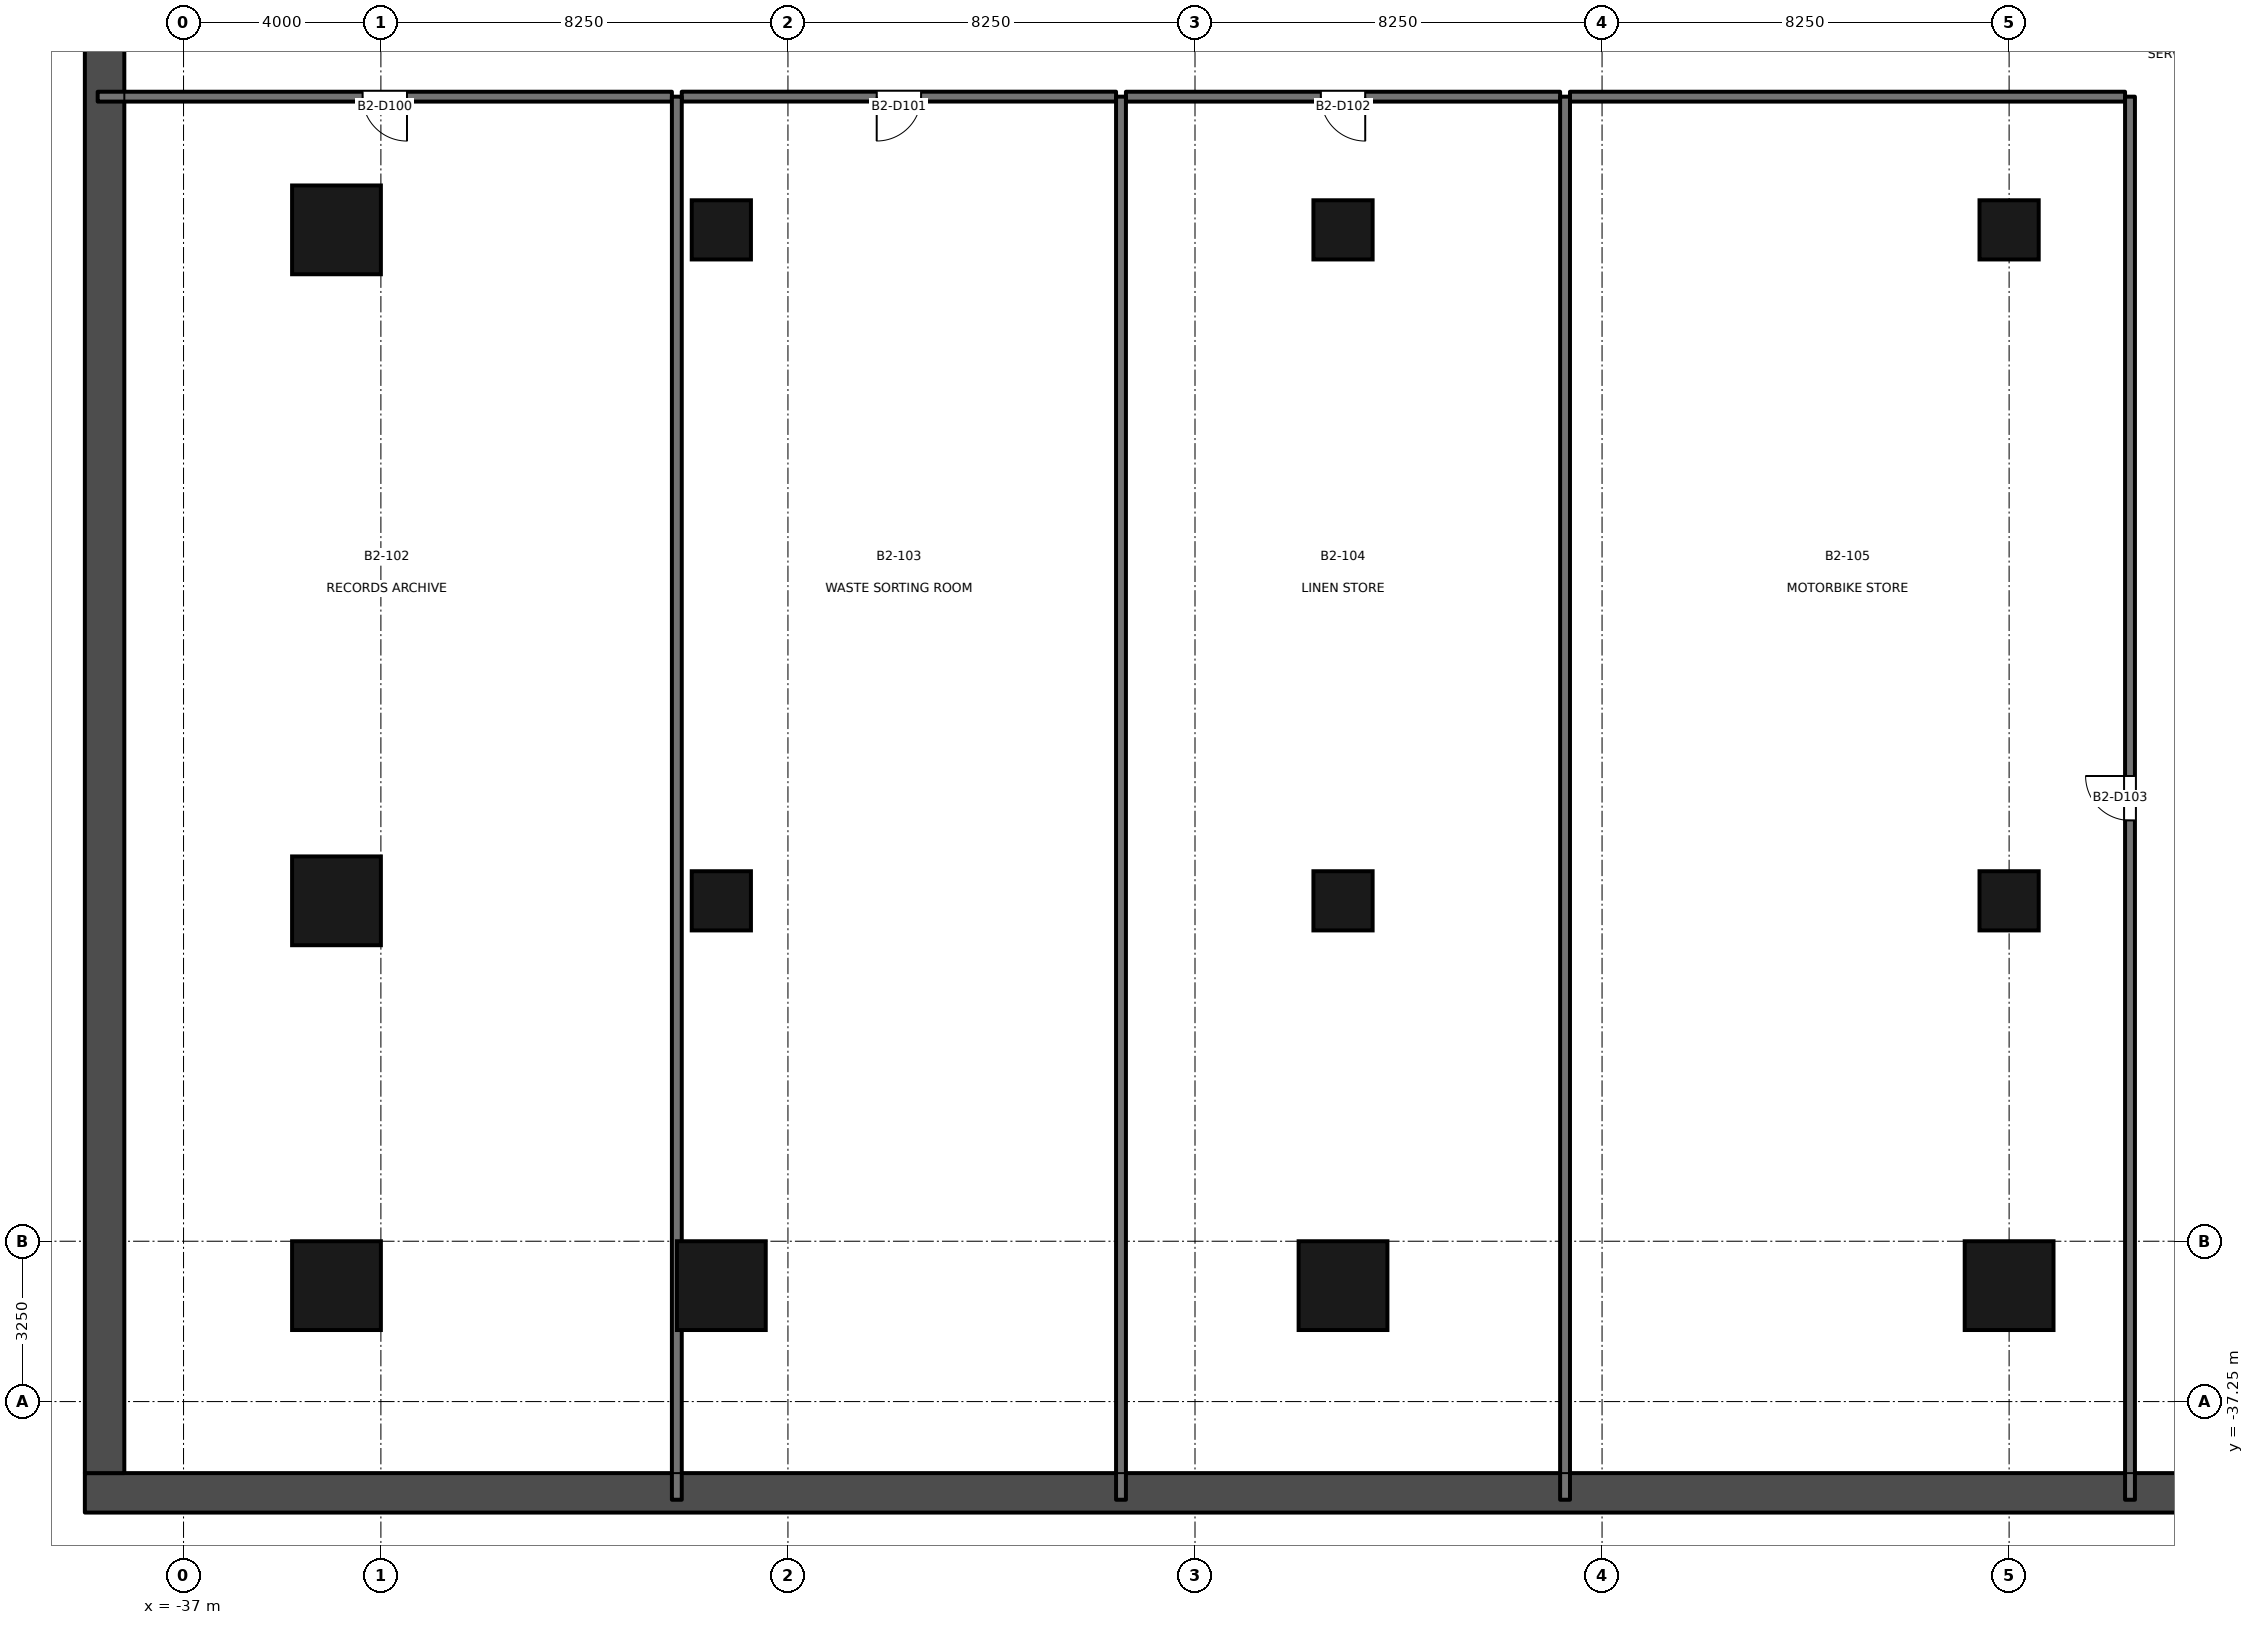
"""IFC4 building model, lengths in metres.
Left out: names, types, materials, properties, quantities, classifications, styles, units other than length and angle.
Written with IfcOpenShell. Run it as: python <this file> out.ifc"""

import sys

from ifc_helpers import new_model, si_unit, direction, frame, frame_2d, origin, origin_2d, place, context, subcontext, project, spatial, rectangle, extrude, element, fill, save


model = new_model("IFC4")
c1 = context("Model", 3, precision=1e-05, world=origin(), true_north=direction((0.0, 1.0)))
c2 = subcontext(c1, "Body", "Model", "MODEL_VIEW")
j1 = project(units=[si_unit("LENGTHUNIT", "METRE"), si_unit("PLANEANGLEUNIT", "RADIAN")], contexts=[c1])
p1 = place(None, origin())
s1 = spatial("IfcSite", under=j1, at=p1, CompositionType="ELEMENT")
p2 = place(p1, origin())
s2 = spatial("IfcBuilding", under=s1, at=p2, CompositionType="ELEMENT")
p3 = place(p2, frame((0.0, 0.0, -9.5)))
s3 = spatial("IfcBuildingStorey", under=s2, at=p3, CompositionType="ELEMENT", Elevation=-9.5)
p4 = place(p3, frame((-39.0, -39.1, -0.2), z_axis=(0.0, 0.0, 1.0), x_axis=(1.0, 0.0, 0.0)))
e1 = element("IfcWall", 1, at=p4, inside=s3, PredefinedType="SOLIDWALL", context=c2, shape_type="SweptSolid", body=[
    extrude(rectangle(XDim=78.0, YDim=0.8, at=frame_2d((39.0, 0.0))), origin(), (0.0, 0.0, 1.0), 4.0),
])
p5 = place(p3, frame((-38.6, -38.7, -0.2), z_axis=(0.0, 0.0, 1.0), x_axis=(0.0, 1.0, 0.0)))
e2 = element("IfcWall", 2, at=p5, inside=s3, PredefinedType="SOLIDWALL", context=c2, shape_type="SweptSolid", body=[
    extrude(rectangle(XDim=51.9, YDim=0.8, at=frame_2d((25.95, 0.0))), origin(), (0.0, 0.0, 1.0), 4.0),
])
for number, where, z_axis, x_axis in (
    (3, (-33.9, -34.9, -0.2), (0.0, 0.0, 1.0), (1.0, 0.0, 0.0)),
    (4, (-26.1, -34.9, -0.2), (0.0, 0.0, 1.0), (1.0, 0.0, 0.0)),
    (5, (-13.5, -34.9, -0.2), (0.0, 0.0, 1.0), (1.0, 0.0, 0.0)),
    (6, (0.0, -34.9, -0.2), (0.0, 0.0, 1.0), (1.0, 0.0, 0.0)),
    (7, (-33.9, -27.1, -0.2), (0.0, 0.0, 1.0), (0.0, 1.0, 0.0)),
    (8, (-33.9, -13.5, -0.2), (0.0, 0.0, 1.0), (0.0, 1.0, 0.0)),
):
    element("IfcColumn", number, at=place(p3, frame(where, z_axis=z_axis, x_axis=x_axis)), inside=s3, PredefinedType="COLUMN", context=c2, shape_type="SweptSolid", body=[
        extrude(rectangle(XDim=1.8, YDim=1.8, at=origin_2d()), origin(), (0.0, 0.0, 1.0), 4.0),
    ])
for number, where, z_axis, x_axis in (
    (9, (-26.1, -27.1, -0.2), (0.0, 0.0, 1.0), (1.0, 0.0, 0.0)),
    (10, (-13.5, -27.1, -0.2), (0.0, 0.0, 1.0), (1.0, 0.0, 0.0)),
    (11, (0.0, -27.1, -0.2), (0.0, 0.0, 1.0), (1.0, 0.0, 0.0)),
    (12, (-26.1, -13.5, -0.2), (0.0, 0.0, 1.0), (1.0, 0.0, 0.0)),
    (13, (-13.5, -13.5, -0.2), (0.0, 0.0, 1.0), (1.0, 0.0, 0.0)),
    (14, (0.0, -13.5, -0.2), (0.0, 0.0, 1.0), (1.0, 0.0, 0.0)),
):
    element("IfcColumn", number, at=place(p3, frame(where, z_axis=z_axis, x_axis=x_axis)), inside=s3, PredefinedType="COLUMN", context=c2, shape_type="SweptSolid", body=[
        extrude(rectangle(XDim=1.2, YDim=1.2, at=origin_2d()), origin(), (0.0, 0.0, 1.0), 4.0),
    ])
p6 = place(p3, frame((-27.102, -10.8, 0.0), z_axis=(0.0, 0.0, 1.0), x_axis=(-1.0, 0.0, 0.0)))
e15 = element("IfcWall", 15, at=p6, inside=s3, PredefinedType="PARTITIONING", context=c2, shape_type="SweptSolid", body=[
    extrude(rectangle(XDim=11.638, YDim=0.2, at=frame_2d((5.819, 0.0))), origin(), (0.0, 0.0, 1.0), 2.8),
])
p7 = place(p6, frame((5.369, 0.0, 0.0)))
e16 = element("IfcOpeningElement", 16, at=p7, cuts=e15, PredefinedType="OPENING", context=c2, shape_type="SweptSolid", body=[
    extrude(rectangle(XDim=0.9, YDim=2.1, at=frame_2d((0.45, 1.05))), frame((0.0, 0.111, 0.0), z_axis=(0.0, -1.0, 0.0), x_axis=(1.0, 0.0, 0.0)), (0.0, 0.0, 1.0), 0.221),
])
p8 = place(p3, frame((-18.1, -10.799, 0.0), z_axis=(0.0, 0.0, 1.0), x_axis=(-1.0, 0.0, 0.0)))
e17 = element("IfcWall", 17, at=p8, inside=s3, PredefinedType="PARTITIONING", context=c2, shape_type="SweptSolid", body=[
    extrude(rectangle(XDim=8.802, YDim=0.2, at=frame_2d((4.401, 0.0))), origin(), (0.0, 0.0, 1.0), 2.6),
])
p9 = place(p8, frame((3.951, 0.0, 0.0)))
e18 = element("IfcOpeningElement", 18, at=p9, cuts=e17, PredefinedType="OPENING", context=c2, shape_type="SweptSolid", body=[
    extrude(rectangle(XDim=0.9, YDim=2.1, at=frame_2d((0.45, 1.05))), frame((0.0, 0.111, 0.0), z_axis=(0.0, -1.0, 0.0), x_axis=(1.0, 0.0, 0.0)), (0.0, 0.0, 1.0), 0.221),
])
p10 = place(p3, frame((-9.1, -10.8, 0.0), z_axis=(0.0, 0.0, 1.0), x_axis=(-1.0, 0.0, 0.0)))
e19 = element("IfcWall", 19, at=p10, inside=s3, PredefinedType="PARTITIONING", context=c2, shape_type="SweptSolid", body=[
    extrude(rectangle(XDim=8.8, YDim=0.2, at=frame_2d((4.4, 0.0))), origin(), (0.0, 0.0, 1.0), 2.4),
])
p11 = place(p10, frame((3.95, 0.0, 0.0)))
e20 = element("IfcOpeningElement", 20, at=p11, cuts=e19, PredefinedType="OPENING", context=c2, shape_type="SweptSolid", body=[
    extrude(rectangle(XDim=0.9, YDim=2.1, at=frame_2d((0.45, 1.05))), frame((0.0, 0.111, 0.0), z_axis=(0.0, -1.0, 0.0), x_axis=(1.0, 0.0, 0.0)), (0.0, 0.0, 1.0), 0.221),
])
p12 = place(p3, frame((2.35, -10.8, 0.0), z_axis=(0.0, 0.0, 1.0), x_axis=(-1.0, 0.0, 0.0)))
e21 = element("IfcWall", 21, at=p12, inside=s3, PredefinedType="PARTITIONING", context=c2, shape_type="SweptSolid", body=[
    extrude(rectangle(XDim=11.25, YDim=0.2, at=frame_2d((5.625, 0.0))), origin(), (0.0, 0.0, 1.0), 2.4),
])
p13 = place(p3, frame((2.45, -39.24, 0.0), z_axis=(0.0, 0.0, 1.0), x_axis=(0.0, 1.0, 0.0)))
e22 = element("IfcWall", 22, at=p13, inside=s3, PredefinedType="PARTITIONING", context=c2, shape_type="SweptSolid", body=[
    extrude(rectangle(XDim=28.44, YDim=0.2, at=frame_2d((14.22, 0.0))), origin(), (0.0, 0.0, 1.0), 2.8),
])
p14 = place(p13, frame((13.77, 0.0, 0.0)))
e23 = element("IfcOpeningElement", 23, at=p14, cuts=e22, PredefinedType="OPENING", context=c2, shape_type="SweptSolid", body=[
    extrude(rectangle(XDim=0.9, YDim=2.1, at=frame_2d((0.45, 1.05))), frame((0.0, 0.111, 0.0), z_axis=(0.0, -1.0, 0.0), x_axis=(1.0, 0.0, 0.0)), (0.0, 0.0, 1.0), 0.221),
])
for number, where, z_axis, x_axis in (
    (24, (-27.002, -10.8, 0.0), (0.0, 0.0, 1.0), (0.0, -1.0, 0.0)),
    (25, (-18.0, -10.8, 0.0), (0.0, 0.0, 1.0), (0.0, -1.0, 0.0)),
    (26, (-9.0, -10.8, 0.0), (0.0, 0.0, 1.0), (0.0, -1.0, 0.0)),
):
    element("IfcWall", number, at=place(p3, frame(where, z_axis=z_axis, x_axis=x_axis)), inside=s3, PredefinedType="PARTITIONING", context=c2, shape_type="SweptSolid", body=[
        extrude(rectangle(XDim=28.44, YDim=0.2, at=frame_2d((14.22, 0.0))), origin(), (0.0, 0.0, 1.0), 2.8),
    ])
p15 = place(p7, origin())
e27 = element("IfcDoor", 27, at=p15, inside=s3, OperationType="SINGLE_SWING_LEFT", PredefinedType="DOOR", context=c2, shape_type="SweptSolid", body=[
    extrude(rectangle(XDim=0.9, YDim=2.1, at=frame_2d((0.45, 1.05))), frame((0.0, 0.025, 0.0), z_axis=(0.0, -1.0, 0.0), x_axis=(1.0, 0.0, 0.0)), (0.0, 0.0, 1.0), 0.05),
])
fill(e16, e27)
p16 = place(p9, origin())
e28 = element("IfcDoor", 28, at=p16, inside=s3, OperationType="SINGLE_SWING_RIGHT", PredefinedType="DOOR", context=c2, shape_type="SweptSolid", body=[
    extrude(rectangle(XDim=0.9, YDim=2.1, at=frame_2d((0.45, 1.05))), frame((0.0, 0.025, 0.0), z_axis=(0.0, -1.0, 0.0), x_axis=(1.0, 0.0, 0.0)), (0.0, 0.0, 1.0), 0.05),
])
fill(e18, e28)
p17 = place(p11, origin())
e29 = element("IfcDoor", 29, at=p17, inside=s3, OperationType="SINGLE_SWING_LEFT", PredefinedType="DOOR", context=c2, shape_type="SweptSolid", body=[
    extrude(rectangle(XDim=0.9, YDim=2.1, at=frame_2d((0.45, 1.05))), frame((0.0, 0.025, 0.0), z_axis=(0.0, -1.0, 0.0), x_axis=(1.0, 0.0, 0.0)), (0.0, 0.0, 1.0), 0.05),
])
fill(e20, e29)
p18 = place(p14, origin())
e30 = element("IfcDoor", 30, at=p18, inside=s3, OperationType="SINGLE_SWING_RIGHT", PredefinedType="DOOR", context=c2, shape_type="SweptSolid", body=[
    extrude(rectangle(XDim=0.9, YDim=2.1, at=frame_2d((0.45, 1.05))), frame((0.0, 0.025, 0.0), z_axis=(0.0, -1.0, 0.0), x_axis=(1.0, 0.0, 0.0)), (0.0, 0.0, 1.0), 0.05),
])
fill(e23, e30)
save(model, sys.argv[1])
